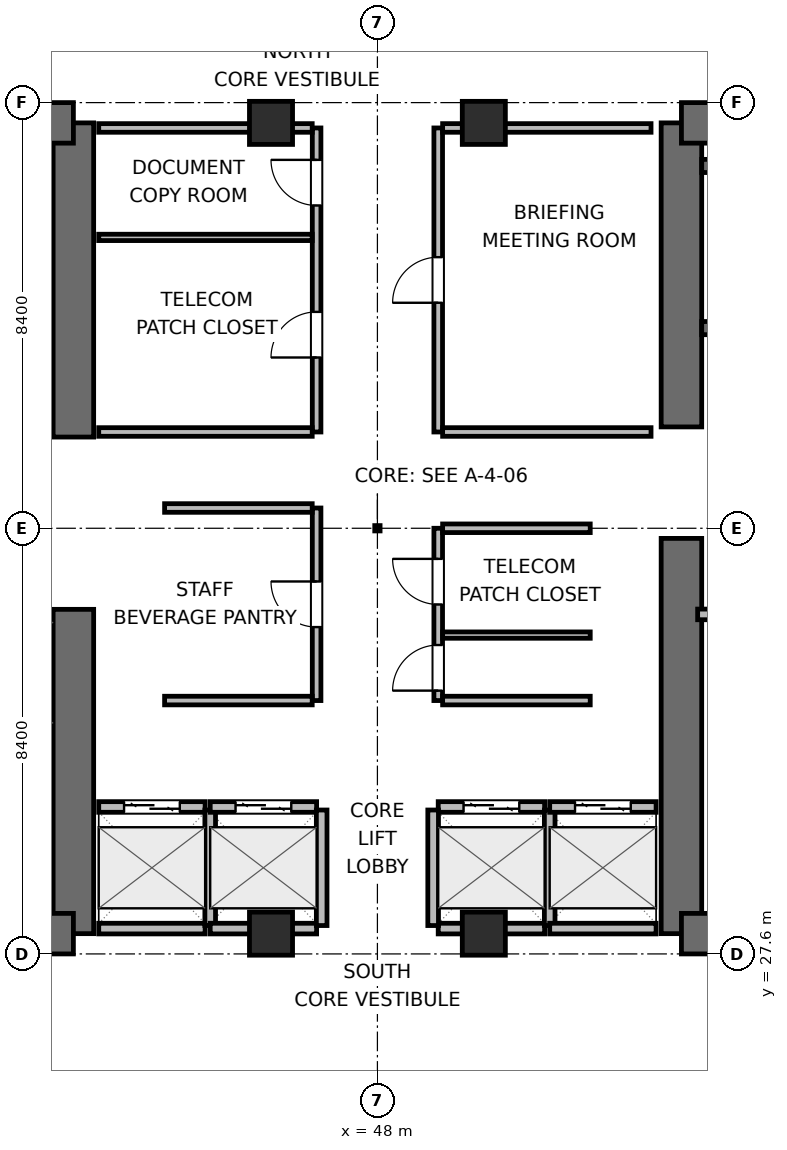
"""IFC4 building model, lengths in metres.
Left out: names, types, materials, properties, quantities, classifications, styles, units other than length and angle.
Written with IfcOpenShell. Run it as: python <this file> out.ifc"""

import sys

from ifc_helpers import new_model, si_unit, direction, frame, frame_2d, origin, origin_2d, place, context, subcontext, project, spatial, rectangle, extrude, element, fill, save


model = new_model("IFC4")
c1 = context("Model", 3, precision=1e-05, world=origin(), true_north=direction((0.0, 1.0)))
c2 = subcontext(c1, "Body", "Model", "MODEL_VIEW")
j1 = project(units=[si_unit("LENGTHUNIT", "METRE"), si_unit("PLANEANGLEUNIT", "RADIAN")], contexts=[c1])
p1 = place(None, origin())
s1 = spatial("IfcSite", under=j1, at=p1, CompositionType="ELEMENT")
p2 = place(p1, origin())
s2 = spatial("IfcBuilding", under=s1, at=p2, CompositionType="ELEMENT")
p3 = place(p2, frame((0.0, 0.0, 93.6)))
s3 = spatial("IfcBuildingStorey", under=s2, at=p3, CompositionType="ELEMENT", Elevation=93.6)
p4 = place(p3, frame((42.0, 28.0, 0.0), z_axis=(0.0, 0.0, 1.0), x_axis=(0.0, 1.0, 0.0)))
e1 = element("IfcWall", 1, at=p4, inside=s3, PredefinedType="SHEAR", context=c2, shape_type="SweptSolid", body=[
    extrude(rectangle(XDim=6.4, YDim=0.8, at=frame_2d((3.2, 0.0))), origin(), (0.0, 0.0, 1.0), 3.9),
])
p5 = place(p3, frame((42.0, 37.8, 0.0), z_axis=(0.0, 0.0, 1.0), x_axis=(0.0, 1.0, 0.0)))
e2 = element("IfcWall", 2, at=p5, inside=s3, PredefinedType="SHEAR", context=c2, shape_type="SweptSolid", body=[
    extrude(rectangle(XDim=6.2, YDim=0.8, at=frame_2d((3.1, 0.0))), origin(), (0.0, 0.0, 1.0), 3.9),
])
p6 = place(p3, frame((32.8, 28.0, 0.0), z_axis=(0.0, 0.0, 1.0), x_axis=(1.0, 0.0, 0.0)))
e3 = element("IfcWall", 3, at=p6, inside=s3, PredefinedType="SHEAR", context=c2, shape_type="SweptSolid", body=[
    extrude(rectangle(XDim=9.2, YDim=0.8, at=frame_2d((4.6, 0.0))), origin(), (0.0, 0.0, 1.0), 3.9),
])
p7 = place(p6, frame((4.975, 0.0, 0.0)))
e4 = element("IfcOpeningElement", 4, at=p7, cuts=e3, PredefinedType="OPENING", context=c2, shape_type="SweptSolid", body=[
    extrude(rectangle(XDim=1.05, YDim=2.04, at=frame_2d((0.525, 1.02))), frame((0.0, 0.41, 0.0), z_axis=(0.0, -1.0, 0.0), x_axis=(1.0, 0.0, 0.0)), (0.0, 0.0, 1.0), 0.82),
])
p8 = place(p3, frame((32.8, 44.0, 0.0), z_axis=(0.0, 0.0, 1.0), x_axis=(1.0, 0.0, 0.0)))
e5 = element("IfcWall", 5, at=p8, inside=s3, PredefinedType="SHEAR", context=c2, shape_type="SweptSolid", body=[
    extrude(rectangle(XDim=9.2, YDim=0.8, at=frame_2d((4.6, 0.0))), origin(), (0.0, 0.0, 1.0), 3.9),
])
p9 = place(p8, frame((0.975, 0.0, 0.0)))
e6 = element("IfcOpeningElement", 6, at=p9, cuts=e5, PredefinedType="OPENING", context=c2, shape_type="SweptSolid", body=[
    extrude(rectangle(XDim=0.95, YDim=2.04, at=frame_2d((0.475, 1.02))), frame((0.0, 0.41, 0.0), z_axis=(0.0, -1.0, 0.0), x_axis=(1.0, 0.0, 0.0)), (0.0, 0.0, 1.0), 0.82),
])
p10 = place(p8, frame((4.225, 0.0, 0.0)))
e7 = element("IfcOpeningElement", 7, at=p10, cuts=e5, PredefinedType="OPENING", context=c2, shape_type="SweptSolid", body=[
    extrude(rectangle(XDim=0.9, YDim=2.02, at=frame_2d((0.45, 1.01))), frame((0.0, 0.41, 0.0), z_axis=(0.0, -1.0, 0.0), x_axis=(1.0, 0.0, 0.0)), (0.0, 0.0, 1.0), 0.82),
])
p11 = place(p8, frame((7.125, 0.0, 0.0)))
e8 = element("IfcOpeningElement", 8, at=p11, cuts=e5, PredefinedType="OPENING", context=c2, shape_type="SweptSolid", body=[
    extrude(rectangle(XDim=0.9, YDim=2.02, at=frame_2d((0.45, 1.01))), frame((0.0, 0.41, 0.0), z_axis=(0.0, -1.0, 0.0), x_axis=(1.0, 0.0, 0.0)), (0.0, 0.0, 1.0), 0.82),
])
p12 = place(p3, frame((54.0, 28.0, 0.0), z_axis=(0.0, 0.0, 1.0), x_axis=(0.0, 1.0, 0.0)))
e9 = element("IfcWall", 9, at=p12, inside=s3, PredefinedType="SHEAR", context=c2, shape_type="SweptSolid", body=[
    extrude(rectangle(XDim=7.8, YDim=0.8, at=frame_2d((3.9, 0.0))), origin(), (0.0, 0.0, 1.0), 3.9),
])
p13 = place(p3, frame((54.0, 38.0, 0.0), z_axis=(0.0, 0.0, 1.0), x_axis=(0.0, 1.0, 0.0)))
e10 = element("IfcWall", 10, at=p13, inside=s3, PredefinedType="SHEAR", context=c2, shape_type="SweptSolid", body=[
    extrude(rectangle(XDim=6.0, YDim=0.8, at=frame_2d((3.0, 0.0))), origin(), (0.0, 0.0, 1.0), 3.9),
])
p14 = place(p3, frame((54.0, 28.0, 0.0), z_axis=(0.0, 0.0, 1.0), x_axis=(1.0, 0.0, 0.0)))
e11 = element("IfcWall", 11, at=p14, inside=s3, PredefinedType="SHEAR", context=c2, shape_type="SweptSolid", body=[
    extrude(rectangle(XDim=9.2, YDim=0.8, at=frame_2d((4.6, 0.0))), origin(), (0.0, 0.0, 1.0), 3.9),
])
p15 = place(p14, frame((3.925, 0.0, 0.0)))
e12 = element("IfcOpeningElement", 12, at=p15, cuts=e11, PredefinedType="OPENING", context=c2, shape_type="SweptSolid", body=[
    extrude(rectangle(XDim=1.05, YDim=2.04, at=frame_2d((0.525, 1.02))), frame((0.0, 0.41, 0.0), z_axis=(0.0, -1.0, 0.0), x_axis=(1.0, 0.0, 0.0)), (0.0, 0.0, 1.0), 0.82),
])
p16 = place(p3, frame((54.0, 44.0, 0.0), z_axis=(0.0, 0.0, 1.0), x_axis=(1.0, 0.0, 0.0)))
e13 = element("IfcWall", 13, at=p16, inside=s3, PredefinedType="SHEAR", context=c2, shape_type="SweptSolid", body=[
    extrude(rectangle(XDim=9.2, YDim=0.8, at=frame_2d((4.6, 0.0))), origin(), (0.0, 0.0, 1.0), 3.9),
])
p17 = place(p3, frame((54.4, 39.95, 0.0), z_axis=(0.0, 0.0, 1.0), x_axis=(1.0, 0.0, 0.0)))
e14 = element("IfcWall", 14, at=p17, inside=s3, PredefinedType="SHEAR", context=c2, shape_type="SweptSolid", body=[
    extrude(rectangle(XDim=8.4, YDim=0.26, at=frame_2d((4.2, 0.0))), origin(), (0.0, 0.0, 1.0), 3.9),
])
p18 = place(p17, frame((0.8, 0.0, 0.0)))
e15 = element("IfcOpeningElement", 15, at=p18, cuts=e14, PredefinedType="OPENING", context=c2, shape_type="SweptSolid", body=[
    extrude(rectangle(XDim=1.0, YDim=2.04, at=frame_2d((0.5, 1.02))), frame((0.0, 0.14, 0.0), z_axis=(0.0, -1.0, 0.0), x_axis=(1.0, 0.0, 0.0)), (0.0, 0.0, 1.0), 0.28),
])
p19 = place(p3, frame((54.4, 43.15, 0.0), z_axis=(0.0, 0.0, 1.0), x_axis=(1.0, 0.0, 0.0)))
e16 = element("IfcWall", 16, at=p19, inside=s3, PredefinedType="SHEAR", context=c2, shape_type="SweptSolid", body=[
    extrude(rectangle(XDim=8.4, YDim=0.26, at=frame_2d((4.2, 0.0))), origin(), (0.0, 0.0, 1.0), 3.9),
])
for number, where, z_axis, x_axis in (
    (17, (45.9, 28.0, 0.0), (0.0, 0.0, 1.0), (1.0, 0.0, 0.0)),
    (18, (50.1, 28.0, 0.0), (0.0, 0.0, 1.0), (1.0, 0.0, 0.0)),
    (19, (45.9, 44.0, 0.0), (0.0, 0.0, 1.0), (1.0, 0.0, 0.0)),
    (20, (50.1, 44.0, 0.0), (0.0, 0.0, 1.0), (1.0, 0.0, 0.0)),
):
    element("IfcColumn", number, at=place(p3, frame(where, z_axis=z_axis, x_axis=x_axis)), inside=s3, PredefinedType="COLUMN", context=c2, shape_type="SweptSolid", body=[
        extrude(rectangle(XDim=0.85, YDim=0.85, at=origin_2d()), origin(), (0.0, 0.0, 1.0), 3.9),
    ])
p20 = place(p3, frame((54.32, 34.3, 0.0), z_axis=(0.0, 0.0, 1.0), x_axis=(1.0, 0.0, 0.0)))
e21 = element("IfcWall", 21, at=p20, inside=s3, PredefinedType="PARTITIONING", context=c2, shape_type="SweptSolid", body=[
    extrude(rectangle(XDim=3.48, YDim=0.21, at=frame_2d((1.74, 0.0))), origin(), (0.0, 0.0, 1.0), 3.64),
])
p21 = place(p3, frame((42.5, 30.5, 0.0), z_axis=(0.0, 0.0, 1.0), x_axis=(1.0, 0.0, 0.0)))
e22 = element("IfcWall", 22, at=p21, inside=s3, PredefinedType="PARTITIONING", context=c2, shape_type="SweptSolid", body=[
    extrude(rectangle(XDim=2.1, YDim=0.21, at=frame_2d((1.05, 0.0))), origin(), (0.0, 0.0, 1.0), 3.64),
])
p22 = place(p21, frame((0.5, 0.0, 0.0)))
e23 = element("IfcOpeningElement", 23, at=p22, cuts=e22, PredefinedType="OPENING", context=c2, shape_type="SweptSolid", body=[
    extrude(rectangle(XDim=1.1, YDim=2.04, at=frame_2d((0.55, 1.02))), frame((0.0, 0.115, 0.0), z_axis=(0.0, -1.0, 0.0), x_axis=(1.0, 0.0, 0.0)), (0.0, 0.0, 1.0), 0.23),
])
p23 = place(p3, frame((42.5, 28.1, 0.0), z_axis=(0.0, 0.0, 1.0), x_axis=(1.0, 0.0, 0.0)))
e24 = element("IfcWall", 24, at=p23, inside=s3, PredefinedType="PARTITIONING", context=c2, shape_type="SweptSolid", body=[
    extrude(rectangle(XDim=2.1, YDim=0.21, at=frame_2d((1.05, 0.0))), origin(), (0.0, 0.0, 1.0), 2.525),
])
p24 = place(p3, frame((44.7, 28.16, 0.0), z_axis=(0.0, 0.0, 1.0), x_axis=(0.0, 1.0, 0.0)))
e25 = element("IfcWall", 25, at=p24, inside=s3, PredefinedType="PARTITIONING", context=c2, shape_type="SweptSolid", body=[
    extrude(rectangle(XDim=2.28, YDim=0.21, at=frame_2d((1.14, 0.0))), origin(), (0.0, 0.0, 1.0), 3.64),
])
p25 = place(p3, frame((44.7, 30.5, 0.0), z_axis=(0.0, 0.0, 1.0), x_axis=(1.0, 0.0, 0.0)))
e26 = element("IfcWall", 26, at=p25, inside=s3, PredefinedType="PARTITIONING", context=c2, shape_type="SweptSolid", body=[
    extrude(rectangle(XDim=2.1, YDim=0.21, at=frame_2d((1.05, 0.0))), origin(), (0.0, 0.0, 1.0), 3.64),
])
p26 = place(p25, frame((0.5, 0.0, 0.0)))
e27 = element("IfcOpeningElement", 27, at=p26, cuts=e26, PredefinedType="OPENING", context=c2, shape_type="SweptSolid", body=[
    extrude(rectangle(XDim=1.1, YDim=2.04, at=frame_2d((0.55, 1.02))), frame((0.0, 0.115, 0.0), z_axis=(0.0, -1.0, 0.0), x_axis=(1.0, 0.0, 0.0)), (0.0, 0.0, 1.0), 0.23),
])
p27 = place(p3, frame((44.7, 28.1, 0.0), z_axis=(0.0, 0.0, 1.0), x_axis=(1.0, 0.0, 0.0)))
e28 = element("IfcWall", 28, at=p27, inside=s3, PredefinedType="PARTITIONING", context=c2, shape_type="SweptSolid", body=[
    extrude(rectangle(XDim=2.1, YDim=0.21, at=frame_2d((1.05, 0.0))), origin(), (0.0, 0.0, 1.0), 2.525),
])
p28 = place(p3, frame((46.9, 28.16, 0.0), z_axis=(0.0, 0.0, 1.0), x_axis=(0.0, 1.0, 0.0)))
e29 = element("IfcWall", 29, at=p28, inside=s3, PredefinedType="PARTITIONING", context=c2, shape_type="SweptSolid", body=[
    extrude(rectangle(XDim=2.28, YDim=0.21, at=frame_2d((1.14, 0.0))), origin(), (0.0, 0.0, 1.0), 3.64),
])
p29 = place(p3, frame((49.2, 30.5, 0.0), z_axis=(0.0, 0.0, 1.0), x_axis=(1.0, 0.0, 0.0)))
e30 = element("IfcWall", 30, at=p29, inside=s3, PredefinedType="PARTITIONING", context=c2, shape_type="SweptSolid", body=[
    extrude(rectangle(XDim=2.1, YDim=0.21, at=frame_2d((1.05, 0.0))), origin(), (0.0, 0.0, 1.0), 3.64),
])
p30 = place(p29, frame((0.5, 0.0, 0.0)))
e31 = element("IfcOpeningElement", 31, at=p30, cuts=e30, PredefinedType="OPENING", context=c2, shape_type="SweptSolid", body=[
    extrude(rectangle(XDim=1.1, YDim=2.04, at=frame_2d((0.55, 1.02))), frame((0.0, 0.115, 0.0), z_axis=(0.0, -1.0, 0.0), x_axis=(1.0, 0.0, 0.0)), (0.0, 0.0, 1.0), 0.23),
])
p31 = place(p3, frame((49.2, 28.1, 0.0), z_axis=(0.0, 0.0, 1.0), x_axis=(1.0, 0.0, 0.0)))
e32 = element("IfcWall", 32, at=p31, inside=s3, PredefinedType="PARTITIONING", context=c2, shape_type="SweptSolid", body=[
    extrude(rectangle(XDim=2.1, YDim=0.21, at=frame_2d((1.05, 0.0))), origin(), (0.0, 0.0, 1.0), 2.525),
])
for number, where, z_axis, x_axis in (
    (33, (49.1, 28.16, 0.0), (0.0, 0.0, 1.0), (0.0, 1.0, 0.0)),
    (34, (51.4, 28.16, 0.0), (0.0, 0.0, 1.0), (0.0, 1.0, 0.0)),
):
    element("IfcWall", number, at=place(p3, frame(where, z_axis=z_axis, x_axis=x_axis)), inside=s3, PredefinedType="PARTITIONING", context=c2, shape_type="SweptSolid", body=[
        extrude(rectangle(XDim=2.28, YDim=0.21, at=frame_2d((1.14, 0.0))), origin(), (0.0, 0.0, 1.0), 3.64),
    ])
p32 = place(p3, frame((51.4, 30.5, 0.0), z_axis=(0.0, 0.0, 1.0), x_axis=(1.0, 0.0, 0.0)))
e35 = element("IfcWall", 35, at=p32, inside=s3, PredefinedType="PARTITIONING", context=c2, shape_type="SweptSolid", body=[
    extrude(rectangle(XDim=2.1, YDim=0.21, at=frame_2d((1.05, 0.0))), origin(), (0.0, 0.0, 1.0), 3.64),
])
p33 = place(p32, frame((0.5, 0.0, 0.0)))
e36 = element("IfcOpeningElement", 36, at=p33, cuts=e35, PredefinedType="OPENING", context=c2, shape_type="SweptSolid", body=[
    extrude(rectangle(XDim=1.1, YDim=2.04, at=frame_2d((0.55, 1.02))), frame((0.0, 0.115, 0.0), z_axis=(0.0, -1.0, 0.0), x_axis=(1.0, 0.0, 0.0)), (0.0, 0.0, 1.0), 0.23),
])
p34 = place(p3, frame((51.4, 28.1, 0.0), z_axis=(0.0, 0.0, 1.0), x_axis=(1.0, 0.0, 0.0)))
e37 = element("IfcWall", 37, at=p34, inside=s3, PredefinedType="PARTITIONING", context=c2, shape_type="SweptSolid", body=[
    extrude(rectangle(XDim=2.1, YDim=0.21, at=frame_2d((1.05, 0.0))), origin(), (0.0, 0.0, 1.0), 2.525),
])
p35 = place(p3, frame((46.8, 32.6, 0.0), z_axis=(0.0, 0.0, 1.0), x_axis=(0.0, 1.0, 0.0)))
e38 = element("IfcWall", 38, at=p35, inside=s3, PredefinedType="PARTITIONING", context=c2, shape_type="SweptSolid", body=[
    extrude(rectangle(XDim=3.8, YDim=0.17, at=frame_2d((1.9, 0.0))), origin(), (0.0, 0.0, 1.0), 3.64),
])
p36 = place(p35, frame((1.45, 0.0, 0.0)))
e39 = element("IfcOpeningElement", 39, at=p36, cuts=e38, PredefinedType="OPENING", context=c2, shape_type="SweptSolid", body=[
    extrude(rectangle(XDim=0.9, YDim=2.02, at=frame_2d((0.45, 1.01))), frame((0.0, 0.095, 0.0), z_axis=(0.0, -1.0, 0.0), x_axis=(1.0, 0.0, 0.0)), (0.0, 0.0, 1.0), 0.19),
])
for number, where, z_axis, x_axis in (
    (40, (43.8, 32.6, 0.0), (0.0, 0.0, 1.0), (1.0, 0.0, 0.0)),
    (41, (43.8, 36.4, 0.0), (0.0, 0.0, 1.0), (1.0, 0.0, 0.0)),
):
    element("IfcWall", number, at=place(p3, frame(where, z_axis=z_axis, x_axis=x_axis)), inside=s3, PredefinedType="PARTITIONING", context=c2, shape_type="SweptSolid", body=[
        extrude(rectangle(XDim=2.913, YDim=0.17, at=frame_2d((1.457, 0.0))), origin(), (0.0, 0.0, 1.0), 3.64),
    ])
p37 = place(p3, frame((49.2, 32.6, 0.0), z_axis=(0.0, 0.0, 1.0), x_axis=(0.0, 1.0, 0.0)))
e42 = element("IfcWall", 42, at=p37, inside=s3, PredefinedType="PARTITIONING", context=c2, shape_type="SweptSolid", body=[
    extrude(rectangle(XDim=3.4, YDim=0.17, at=frame_2d((1.7, 0.0))), origin(), (0.0, 0.0, 1.0), 3.64),
])
p38 = place(p37, frame((0.196, 0.0, 0.0)))
e43 = element("IfcOpeningElement", 43, at=p38, cuts=e42, PredefinedType="OPENING", context=c2, shape_type="SweptSolid", body=[
    extrude(rectangle(XDim=0.9, YDim=2.02, at=frame_2d((0.45, 1.01))), frame((0.0, 0.095, 0.0), z_axis=(0.0, -1.0, 0.0), x_axis=(1.0, 0.0, 0.0)), (0.0, 0.0, 1.0), 0.19),
])
p39 = place(p37, frame((1.896, 0.0, 0.0)))
e44 = element("IfcOpeningElement", 44, at=p39, cuts=e42, PredefinedType="OPENING", context=c2, shape_type="SweptSolid", body=[
    extrude(rectangle(XDim=0.9, YDim=2.02, at=frame_2d((0.45, 1.01))), frame((0.0, 0.095, 0.0), z_axis=(0.0, -1.0, 0.0), x_axis=(1.0, 0.0, 0.0)), (0.0, 0.0, 1.0), 0.19),
])
for number, where, z_axis, x_axis in (
    (45, (49.287, 32.6, 0.0), (0.0, 0.0, 1.0), (1.0, 0.0, 0.0)),
    (46, (49.287, 36.0, 0.0), (0.0, 0.0, 1.0), (1.0, 0.0, 0.0)),
):
    element("IfcWall", number, at=place(p3, frame(where, z_axis=z_axis, x_axis=x_axis)), inside=s3, PredefinedType="PARTITIONING", context=c2, shape_type="SweptSolid", body=[
        extrude(rectangle(XDim=2.913, YDim=0.17, at=frame_2d((1.457, 0.0))), origin(), (0.0, 0.0, 1.0), 3.64),
    ])
p40 = place(p3, frame((49.287, 33.892, 0.0), z_axis=(0.0, 0.0, 1.0), x_axis=(1.0, 0.0, 0.0)))
e47 = element("IfcWall", 47, at=p40, inside=s3, PredefinedType="PARTITIONING", context=c2, shape_type="SweptSolid", body=[
    extrude(rectangle(XDim=2.913, YDim=0.125, at=frame_2d((1.457, 0.0))), origin(), (0.0, 0.0, 1.0), 3.64),
])
p41 = place(p3, frame((46.8, 37.9, 0.0), z_axis=(0.0, 0.0, 1.0), x_axis=(0.0, 1.0, 0.0)))
e48 = element("IfcWall", 48, at=p41, inside=s3, PredefinedType="PARTITIONING", context=c2, shape_type="SweptSolid", body=[
    extrude(rectangle(XDim=6.0, YDim=0.17, at=frame_2d((3.0, 0.0))), origin(), (0.0, 0.0, 1.0), 3.64),
])
p42 = place(p41, frame((1.47, 0.0, 0.0)))
e49 = element("IfcOpeningElement", 49, at=p42, cuts=e48, PredefinedType="OPENING", context=c2, shape_type="SweptSolid", body=[
    extrude(rectangle(XDim=0.9, YDim=2.02, at=frame_2d((0.45, 1.01))), frame((0.0, 0.095, 0.0), z_axis=(0.0, -1.0, 0.0), x_axis=(1.0, 0.0, 0.0)), (0.0, 0.0, 1.0), 0.19),
])
p43 = place(p41, frame((4.47, 0.0, 0.0)))
e50 = element("IfcOpeningElement", 50, at=p43, cuts=e48, PredefinedType="OPENING", context=c2, shape_type="SweptSolid", body=[
    extrude(rectangle(XDim=0.9, YDim=2.02, at=frame_2d((0.45, 1.01))), frame((0.0, 0.095, 0.0), z_axis=(0.0, -1.0, 0.0), x_axis=(1.0, 0.0, 0.0)), (0.0, 0.0, 1.0), 0.19),
])
p44 = place(p3, frame((42.5, 37.9, 0.0), z_axis=(0.0, 0.0, 1.0), x_axis=(1.0, 0.0, 0.0)))
e51 = element("IfcWall", 51, at=p44, inside=s3, PredefinedType="PARTITIONING", context=c2, shape_type="SweptSolid", body=[
    extrude(rectangle(XDim=4.213, YDim=0.17, at=frame_2d((2.106, 0.0))), origin(), (0.0, 0.0, 1.0), 3.64),
])
p45 = place(p3, frame((42.5, 43.9, 0.0), z_axis=(0.0, 0.0, 1.0), x_axis=(1.0, 0.0, 0.0)))
e52 = element("IfcWall", 52, at=p45, inside=s3, PredefinedType="PARTITIONING", context=c2, shape_type="SweptSolid", body=[
    extrude(rectangle(XDim=4.213, YDim=0.17, at=frame_2d((2.106, 0.0))), origin(), (0.0, 0.0, 1.0), 2.525),
])
p46 = place(p3, frame((42.5, 41.74, 0.0), z_axis=(0.0, 0.0, 1.0), x_axis=(1.0, 0.0, 0.0)))
e53 = element("IfcWall", 53, at=p46, inside=s3, PredefinedType="PARTITIONING", context=c2, shape_type="SweptSolid", body=[
    extrude(rectangle(XDim=4.213, YDim=0.125, at=frame_2d((2.106, 0.0))), origin(), (0.0, 0.0, 1.0), 3.64),
])
p47 = place(p3, frame((49.2, 37.9, 0.0), z_axis=(0.0, 0.0, 1.0), x_axis=(0.0, 1.0, 0.0)))
e54 = element("IfcWall", 54, at=p47, inside=s3, PredefinedType="PARTITIONING", context=c2, shape_type="SweptSolid", body=[
    extrude(rectangle(XDim=6.0, YDim=0.17, at=frame_2d((3.0, 0.0))), origin(), (0.0, 0.0, 1.0), 3.64),
])
p48 = place(p47, frame((2.55, 0.0, 0.0)))
e55 = element("IfcOpeningElement", 55, at=p48, cuts=e54, PredefinedType="OPENING", context=c2, shape_type="SweptSolid", body=[
    extrude(rectangle(XDim=0.9, YDim=2.02, at=frame_2d((0.45, 1.01))), frame((0.0, 0.095, 0.0), z_axis=(0.0, -1.0, 0.0), x_axis=(1.0, 0.0, 0.0)), (0.0, 0.0, 1.0), 0.19),
])
p49 = place(p3, frame((49.287, 37.9, 0.0), z_axis=(0.0, 0.0, 1.0), x_axis=(1.0, 0.0, 0.0)))
e56 = element("IfcWall", 56, at=p49, inside=s3, PredefinedType="PARTITIONING", context=c2, shape_type="SweptSolid", body=[
    extrude(rectangle(XDim=4.113, YDim=0.17, at=frame_2d((2.056, 0.0))), origin(), (0.0, 0.0, 1.0), 3.64),
])
p50 = place(p3, frame((49.287, 43.9, 0.0), z_axis=(0.0, 0.0, 1.0), x_axis=(1.0, 0.0, 0.0)))
e57 = element("IfcWall", 57, at=p50, inside=s3, PredefinedType="PARTITIONING", context=c2, shape_type="SweptSolid", body=[
    extrude(rectangle(XDim=4.113, YDim=0.17, at=frame_2d((2.056, 0.0))), origin(), (0.0, 0.0, 1.0), 2.525),
])
p51 = place(p22, origin())
e58 = element("IfcDoor", 58, at=p51, inside=s3, OperationType="DOUBLE_DOOR_SLIDING", PredefinedType="DOOR", context=c2, shape_type="SweptSolid", body=[
    extrude(rectangle(XDim=1.1, YDim=2.04, at=frame_2d((0.55, 1.02))), frame((0.0, 0.025, 0.0), z_axis=(0.0, -1.0, 0.0), x_axis=(1.0, 0.0, 0.0)), (0.0, 0.0, 1.0), 0.05),
])
fill(e23, e58)
p52 = place(p26, origin())
e59 = element("IfcDoor", 59, at=p52, inside=s3, OperationType="DOUBLE_DOOR_SLIDING", PredefinedType="DOOR", context=c2, shape_type="SweptSolid", body=[
    extrude(rectangle(XDim=1.1, YDim=2.04, at=frame_2d((0.55, 1.02))), frame((0.0, 0.025, 0.0), z_axis=(0.0, -1.0, 0.0), x_axis=(1.0, 0.0, 0.0)), (0.0, 0.0, 1.0), 0.05),
])
fill(e27, e59)
p53 = place(p30, origin())
e60 = element("IfcDoor", 60, at=p53, inside=s3, OperationType="DOUBLE_DOOR_SLIDING", PredefinedType="DOOR", context=c2, shape_type="SweptSolid", body=[
    extrude(rectangle(XDim=1.1, YDim=2.04, at=frame_2d((0.55, 1.02))), frame((0.0, 0.025, 0.0), z_axis=(0.0, -1.0, 0.0), x_axis=(1.0, 0.0, 0.0)), (0.0, 0.0, 1.0), 0.05),
])
fill(e31, e60)
p54 = place(p33, origin())
e61 = element("IfcDoor", 61, at=p54, inside=s3, OperationType="DOUBLE_DOOR_SLIDING", PredefinedType="DOOR", context=c2, shape_type="SweptSolid", body=[
    extrude(rectangle(XDim=1.1, YDim=2.04, at=frame_2d((0.55, 1.02))), frame((0.0, 0.025, 0.0), z_axis=(0.0, -1.0, 0.0), x_axis=(1.0, 0.0, 0.0)), (0.0, 0.0, 1.0), 0.05),
])
fill(e36, e61)
p55 = place(p36, origin())
e62 = element("IfcDoor", 62, at=p55, inside=s3, OperationType="SINGLE_SWING_RIGHT", PredefinedType="DOOR", context=c2, shape_type="SweptSolid", body=[
    extrude(rectangle(XDim=0.9, YDim=2.02, at=frame_2d((0.45, 1.01))), frame((0.0, 0.025, 0.0), z_axis=(0.0, -1.0, 0.0), x_axis=(1.0, 0.0, 0.0)), (0.0, 0.0, 1.0), 0.05),
])
fill(e39, e62)
p56 = place(p38, origin())
e63 = element("IfcDoor", 63, at=p56, inside=s3, OperationType="SINGLE_SWING_LEFT", PredefinedType="DOOR", context=c2, shape_type="SweptSolid", body=[
    extrude(rectangle(XDim=0.9, YDim=2.02, at=frame_2d((0.45, 1.01))), frame((0.0, 0.025, 0.0), z_axis=(0.0, -1.0, 0.0), x_axis=(1.0, 0.0, 0.0)), (0.0, 0.0, 1.0), 0.05),
])
fill(e43, e63)
p57 = place(p39, origin())
e64 = element("IfcDoor", 64, at=p57, inside=s3, OperationType="SINGLE_SWING_RIGHT", PredefinedType="DOOR", context=c2, shape_type="SweptSolid", body=[
    extrude(rectangle(XDim=0.9, YDim=2.02, at=frame_2d((0.45, 1.01))), frame((0.0, 0.025, 0.0), z_axis=(0.0, -1.0, 0.0), x_axis=(1.0, 0.0, 0.0)), (0.0, 0.0, 1.0), 0.05),
])
fill(e44, e64)
p58 = place(p42, origin())
e65 = element("IfcDoor", 65, at=p58, inside=s3, OperationType="SINGLE_SWING_LEFT", PredefinedType="DOOR", context=c2, shape_type="SweptSolid", body=[
    extrude(rectangle(XDim=0.9, YDim=2.02, at=frame_2d((0.45, 1.01))), frame((0.0, 0.025, 0.0), z_axis=(0.0, -1.0, 0.0), x_axis=(1.0, 0.0, 0.0)), (0.0, 0.0, 1.0), 0.05),
])
fill(e49, e65)
p59 = place(p43, origin())
e66 = element("IfcDoor", 66, at=p59, inside=s3, OperationType="SINGLE_SWING_RIGHT", PredefinedType="DOOR", context=c2, shape_type="SweptSolid", body=[
    extrude(rectangle(XDim=0.9, YDim=2.02, at=frame_2d((0.45, 1.01))), frame((0.0, 0.025, 0.0), z_axis=(0.0, -1.0, 0.0), x_axis=(1.0, 0.0, 0.0)), (0.0, 0.0, 1.0), 0.05),
])
fill(e50, e66)
p60 = place(p48, origin())
e67 = element("IfcDoor", 67, at=p60, inside=s3, OperationType="SINGLE_SWING_LEFT", PredefinedType="DOOR", context=c2, shape_type="SweptSolid", body=[
    extrude(rectangle(XDim=0.9, YDim=2.02, at=frame_2d((0.45, 1.01))), frame((0.0, 0.025, 0.0), z_axis=(0.0, -1.0, 0.0), x_axis=(1.0, 0.0, 0.0)), (0.0, 0.0, 1.0), 0.05),
])
fill(e55, e67)
save(model, sys.argv[1])
